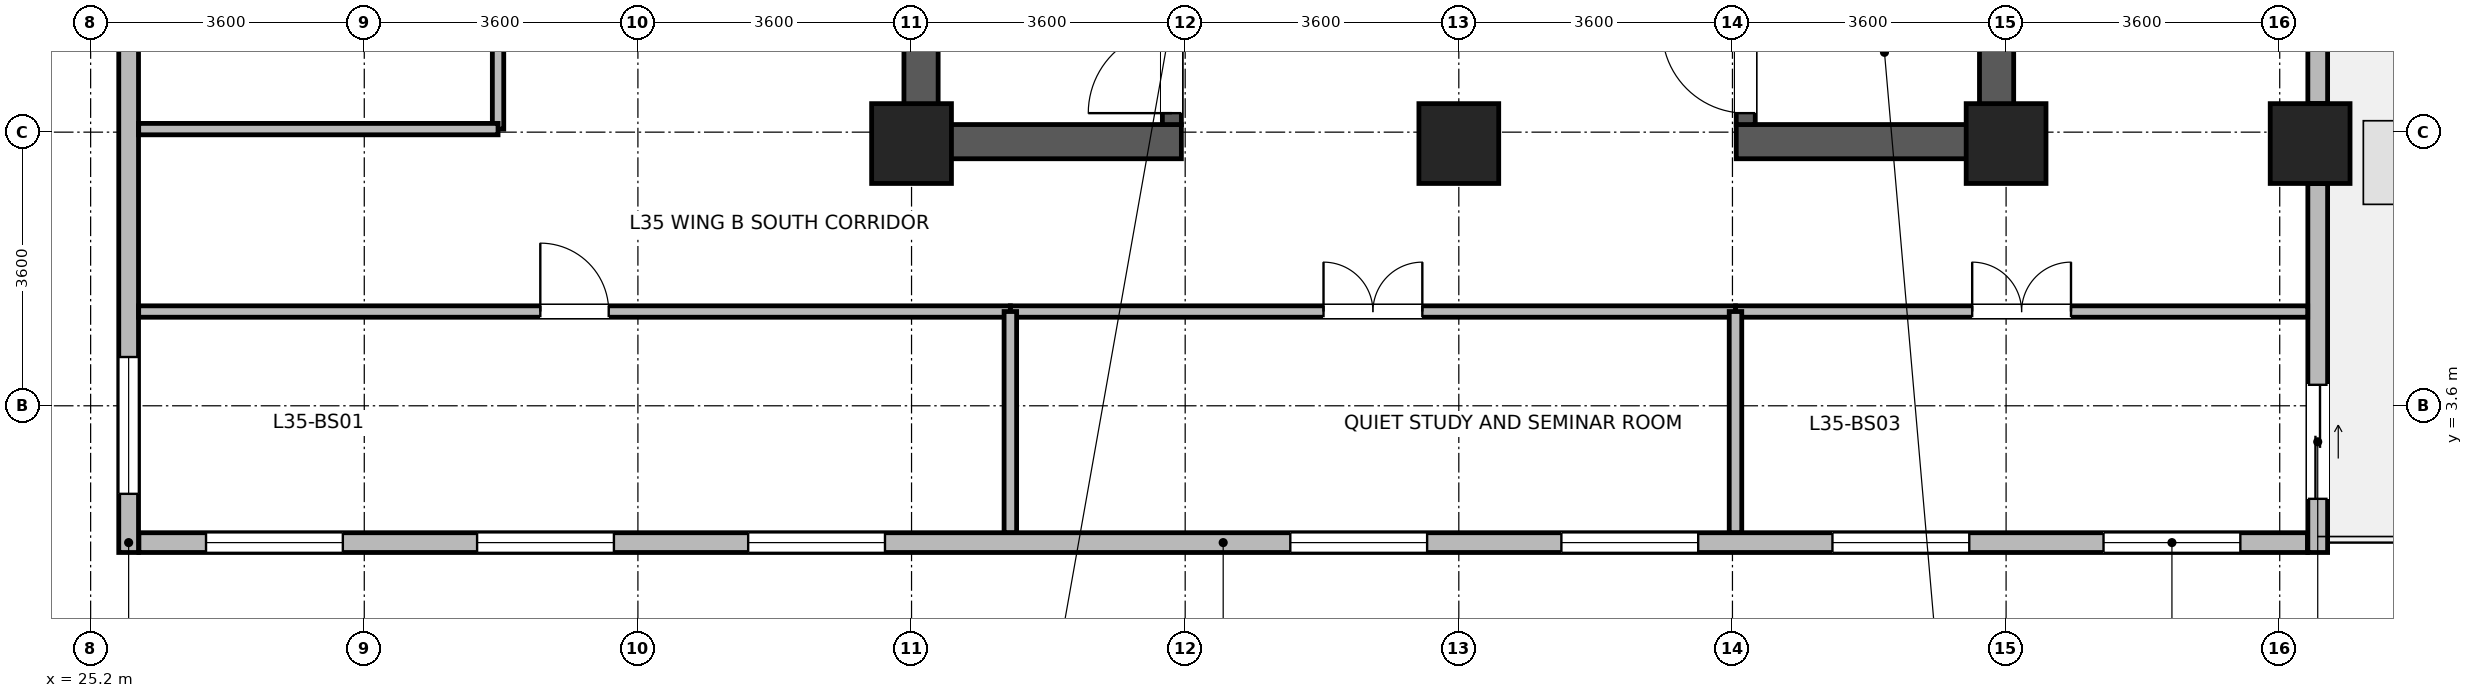
"""IFC4 building model, lengths in metres.
Left out: names, types, materials, properties, quantities, classifications, styles, units other than length and angle.
Written with IfcOpenShell. Run it as: python <this file> out.ifc"""

import sys

from ifc_helpers import new_model, si_unit, direction, frame, frame_2d, origin, origin_2d, place, context, subcontext, project, spatial, rectangle, extrude, source, transform, mapped, element, fill, save


model = new_model("IFC4")
c1 = context("Model", 3, precision=1e-05, world=origin(), true_north=direction((0.0, 1.0)))
c2 = subcontext(c1, "Body", "Model", "MODEL_VIEW")
j1 = project(units=[si_unit("LENGTHUNIT", "METRE"), si_unit("PLANEANGLEUNIT", "RADIAN")], contexts=[c1])
p1 = place(None, origin())
s1 = spatial("IfcSite", under=j1, at=p1, CompositionType="ELEMENT")
p2 = place(p1, origin())
s2 = spatial("IfcBuilding", under=s1, at=p2, CompositionType="ELEMENT")
p3 = place(p2, frame((0.0, 0.0, 140.2)))
s3 = spatial("IfcBuildingStorey", under=s2, at=p3, CompositionType="ELEMENT", Elevation=140.2)
for number, where, z_axis, x_axis in (
    (1, (36.125, 6.85, 0.0), (0.0, 0.0, 1.0), (0.0, 1.0, 0.0)),
    (2, (50.275, 6.85, 0.0), (0.0, 0.0, 1.0), (0.0, 1.0, 0.0)),
):
    element("IfcWall", number, at=place(p3, frame(where, z_axis=z_axis, x_axis=x_axis)), inside=s3, PredefinedType="SHEAR", context=c2, shape_type="SweptSolid", body=[
        extrude(rectangle(XDim=7.9, YDim=0.45, at=frame_2d((3.95, 0.0))), origin(), (0.0, 0.0, 1.0), 3.46),
    ])
for number, where, z_axis, x_axis in (
    (3, (36.35, 7.075, 0.0), (0.0, 0.0, 1.0), (1.0, 0.0, 0.0)),
    (4, (46.85, 7.075, 0.0), (0.0, 0.0, 1.0), (1.0, 0.0, 0.0)),
):
    element("IfcWall", number, at=place(p3, frame(where, z_axis=z_axis, x_axis=x_axis)), inside=s3, PredefinedType="SHEAR", context=c2, shape_type="SweptSolid", body=[
        extrude(rectangle(XDim=3.2, YDim=0.45, at=frame_2d((1.6, 0.0))), origin(), (0.0, 0.0, 1.0), 3.46),
    ])
p4 = place(p3, frame((39.425, 7.3, 0.0), z_axis=(0.0, 0.0, 1.0), x_axis=(0.0, 1.0, 0.0)))
e5 = element("IfcWall", 5, at=p4, inside=s3, PredefinedType="SHEAR", context=c2, shape_type="SweptSolid", body=[
    extrude(rectangle(XDim=7.0, YDim=0.25, at=frame_2d((3.5, 0.0))), origin(), (0.0, 0.0, 1.0), 3.46),
])
p5 = place(p4, frame((0.15, 0.0, 0.0)))
e6 = element("IfcOpeningElement", 6, at=p5, cuts=e5, PredefinedType="OPENING", context=c2, shape_type="SweptSolid", body=[
    extrude(rectangle(XDim=1.1, YDim=2.08, at=frame_2d((0.55, 1.04))), frame((0.0, 0.135, 0.0), z_axis=(0.0, -1.0, 0.0), x_axis=(1.0, 0.0, 0.0)), (0.0, 0.0, 1.0), 0.27),
])
p6 = place(p3, frame((46.975, 7.3, 0.0), z_axis=(0.0, 0.0, 1.0), x_axis=(0.0, 1.0, 0.0)))
e7 = element("IfcWall", 7, at=p6, inside=s3, PredefinedType="SHEAR", context=c2, shape_type="SweptSolid", body=[
    extrude(rectangle(XDim=7.0, YDim=0.25, at=frame_2d((3.5, 0.0))), origin(), (0.0, 0.0, 1.0), 3.46),
])
p7 = place(p6, frame((0.15, 0.0, 0.0)))
e8 = element("IfcOpeningElement", 8, at=p7, cuts=e7, PredefinedType="OPENING", context=c2, shape_type="SweptSolid", body=[
    extrude(rectangle(XDim=1.1, YDim=2.08, at=frame_2d((0.55, 1.04))), frame((0.0, 0.135, 0.0), z_axis=(0.0, -1.0, 0.0), x_axis=(1.0, 0.0, 0.0)), (0.0, 0.0, 1.0), 0.27),
])
m1 = source(origin(), c2, "Body", "SweptSolid", [
    extrude(rectangle(XDim=1.05, YDim=1.05, at=origin_2d()), origin(), (0.0, 0.0, 1.0), 3.7),
])
for number, where, z_axis, x_axis in (
    (9, (36.0, 7.05, 0.0), (0.0, 0.0, 1.0), (1.0, 0.0, 0.0)),
    (10, (43.2, 7.05, 0.0), (0.0, 0.0, 1.0), (1.0, 0.0, 0.0)),
    (11, (50.4, 7.05, 0.0), (0.0, 0.0, 1.0), (1.0, 0.0, 0.0)),
    (12, (54.4, 7.05, 0.0), (0.0, 0.0, 1.0), (1.0, 0.0, 0.0)),
):
    element("IfcColumn", number, at=place(p3, frame(where, z_axis=z_axis, x_axis=x_axis)), inside=s3, PredefinedType="COLUMN", context=c2, shape_type="MappedRepresentation", body=[
        mapped(m1, transform((0.0, 0.0, 0.0), x_axis=(1.0, 0.0, 0.0), y_axis=(0.0, 1.0, 0.0), z_axis=(0.0, 0.0, 1.0), scale=1.0)),
    ])
p8 = place(p3, frame((54.365, 1.8, 0.0), z_axis=(0.0, 0.0, 1.0), x_axis=(-1.0, 0.0, 0.0)))
e13 = element("IfcWall", 13, at=p8, inside=s3, PredefinedType="STANDARD", context=c2, shape_type="SweptSolid", body=[
    extrude(rectangle(XDim=28.53, YDim=0.26, at=frame_2d((14.265, 0.0))), origin(), (0.0, 0.0, 1.0), 3.44),
])
p9 = place(p8, frame((0.883, 0.0, 0.85)))
e14 = element("IfcOpeningElement", 14, at=p9, cuts=e13, PredefinedType="OPENING", context=c2, shape_type="SweptSolid", body=[
    extrude(rectangle(XDim=1.8, YDim=1.85, at=frame_2d((0.9, 0.925))), frame((0.0, 0.14, 0.0), z_axis=(0.0, -1.0, 0.0), x_axis=(1.0, 0.0, 0.0)), (0.0, 0.0, 1.0), 0.28),
])
p10 = place(p8, frame((4.449, 0.0, 0.85)))
e15 = element("IfcOpeningElement", 15, at=p10, cuts=e13, PredefinedType="OPENING", context=c2, shape_type="SweptSolid", body=[
    extrude(rectangle(XDim=1.8, YDim=1.85, at=frame_2d((0.9, 0.925))), frame((0.0, 0.14, 0.0), z_axis=(0.0, -1.0, 0.0), x_axis=(1.0, 0.0, 0.0)), (0.0, 0.0, 1.0), 0.28),
])
p11 = place(p8, frame((8.016, 0.0, 0.85)))
e16 = element("IfcOpeningElement", 16, at=p11, cuts=e13, PredefinedType="OPENING", context=c2, shape_type="SweptSolid", body=[
    extrude(rectangle(XDim=1.8, YDim=1.85, at=frame_2d((0.9, 0.925))), frame((0.0, 0.14, 0.0), z_axis=(0.0, -1.0, 0.0), x_axis=(1.0, 0.0, 0.0)), (0.0, 0.0, 1.0), 0.28),
])
p12 = place(p8, frame((11.582, 0.0, 0.85)))
e17 = element("IfcOpeningElement", 17, at=p12, cuts=e13, PredefinedType="OPENING", context=c2, shape_type="SweptSolid", body=[
    extrude(rectangle(XDim=1.8, YDim=1.85, at=frame_2d((0.9, 0.925))), frame((0.0, 0.14, 0.0), z_axis=(0.0, -1.0, 0.0), x_axis=(1.0, 0.0, 0.0)), (0.0, 0.0, 1.0), 0.28),
])
p13 = place(p8, frame((18.714, 0.0, 0.85)))
e18 = element("IfcOpeningElement", 18, at=p13, cuts=e13, PredefinedType="OPENING", context=c2, shape_type="SweptSolid", body=[
    extrude(rectangle(XDim=1.8, YDim=1.85, at=frame_2d((0.9, 0.925))), frame((0.0, 0.14, 0.0), z_axis=(0.0, -1.0, 0.0), x_axis=(1.0, 0.0, 0.0)), (0.0, 0.0, 1.0), 0.28),
])
p14 = place(p8, frame((22.281, 0.0, 0.85)))
e19 = element("IfcOpeningElement", 19, at=p14, cuts=e13, PredefinedType="OPENING", context=c2, shape_type="SweptSolid", body=[
    extrude(rectangle(XDim=1.8, YDim=1.85, at=frame_2d((0.9, 0.925))), frame((0.0, 0.14, 0.0), z_axis=(0.0, -1.0, 0.0), x_axis=(1.0, 0.0, 0.0)), (0.0, 0.0, 1.0), 0.28),
])
p15 = place(p8, frame((25.847, 0.0, 0.85)))
e20 = element("IfcOpeningElement", 20, at=p15, cuts=e13, PredefinedType="OPENING", context=c2, shape_type="SweptSolid", body=[
    extrude(rectangle(XDim=1.8, YDim=1.85, at=frame_2d((0.9, 0.925))), frame((0.0, 0.14, 0.0), z_axis=(0.0, -1.0, 0.0), x_axis=(1.0, 0.0, 0.0)), (0.0, 0.0, 1.0), 0.28),
])
p16 = place(p3, frame((54.5, 6.524, 0.0), z_axis=(0.0, 0.0, 1.0), x_axis=(0.0, -1.0, 0.0)))
e21 = element("IfcWall", 21, at=p16, inside=s3, PredefinedType="STANDARD", context=c2, shape_type="SweptSolid", body=[
    extrude(rectangle(XDim=4.854, YDim=0.26, at=frame_2d((2.427, 0.0))), origin(), (0.0, 0.0, 1.0), 3.44),
])
p17 = place(p16, frame((2.648, 0.0, 0.0)))
e22 = element("IfcOpeningElement", 22, at=p17, cuts=e21, PredefinedType="OPENING", context=c2, shape_type="SweptSolid", body=[
    extrude(rectangle(XDim=1.5, YDim=2.15, at=frame_2d((0.75, 1.075))), frame((0.0, 0.14, 0.0), z_axis=(0.0, -1.0, 0.0), x_axis=(1.0, 0.0, 0.0)), (0.0, 0.0, 1.0), 0.28),
])
p18 = place(p3, frame((54.5, 14.024, 0.0), z_axis=(0.0, 0.0, 1.0), x_axis=(0.0, -1.0, 0.0)))
e23 = element("IfcWall", 23, at=p18, inside=s3, PredefinedType="STANDARD", context=c2, shape_type="SweptSolid", body=[
    extrude(rectangle(XDim=6.448, YDim=0.26, at=frame_2d((3.224, 0.0))), origin(), (0.0, 0.0, 1.0), 2.99),
])
p19 = place(p18, frame((3.936, 0.0, 0.85)))
e24 = element("IfcOpeningElement", 24, at=p19, cuts=e23, PredefinedType="OPENING", context=c2, shape_type="SweptSolid", body=[
    extrude(rectangle(XDim=1.8, YDim=1.85, at=frame_2d((0.9, 0.925))), frame((0.0, 0.14, 0.0), z_axis=(0.0, -1.0, 0.0), x_axis=(1.0, 0.0, 0.0)), (0.0, 0.0, 1.0), 0.28),
])
p20 = place(p18, frame((1.15, 0.0, 0.85)))
e25 = element("IfcOpeningElement", 25, at=p20, cuts=e23, PredefinedType="OPENING", context=c2, shape_type="SweptSolid", body=[
    extrude(rectangle(XDim=0.95, YDim=1.75, at=frame_2d((0.475, 0.875))), frame((0.0, 0.14, 0.0), z_axis=(0.0, -1.0, 0.0), x_axis=(1.0, 0.0, 0.0)), (0.0, 0.0, 1.0), 0.28),
])
p21 = place(p3, frame((25.7, 1.67, 0.0), z_axis=(0.0, 0.0, 1.0), x_axis=(0.0, 1.0, 0.0)))
e26 = element("IfcWall", 26, at=p21, inside=s3, PredefinedType="STANDARD", context=c2, shape_type="SweptSolid", body=[
    extrude(rectangle(XDim=20.06, YDim=0.26, at=frame_2d((10.03, 0.0))), origin(), (0.0, 0.0, 1.0), 3.44),
])
p22 = place(p21, frame((0.772, 0.0, 0.85)))
e27 = element("IfcOpeningElement", 27, at=p22, cuts=e26, PredefinedType="OPENING", context=c2, shape_type="SweptSolid", body=[
    extrude(rectangle(XDim=1.8, YDim=1.85, at=frame_2d((0.9, 0.925))), frame((0.0, 0.14, 0.0), z_axis=(0.0, -1.0, 0.0), x_axis=(1.0, 0.0, 0.0)), (0.0, 0.0, 1.0), 0.28),
])
p23 = place(p21, frame((7.458, 0.0, 0.85)))
e28 = element("IfcOpeningElement", 28, at=p23, cuts=e26, PredefinedType="OPENING", context=c2, shape_type="SweptSolid", body=[
    extrude(rectangle(XDim=1.8, YDim=1.85, at=frame_2d((0.9, 0.925))), frame((0.0, 0.14, 0.0), z_axis=(0.0, -1.0, 0.0), x_axis=(1.0, 0.0, 0.0)), (0.0, 0.0, 1.0), 0.28),
])
p24 = place(p21, frame((14.145, 0.0, 0.85)))
e29 = element("IfcOpeningElement", 29, at=p24, cuts=e26, PredefinedType="OPENING", context=c2, shape_type="SweptSolid", body=[
    extrude(rectangle(XDim=1.8, YDim=1.85, at=frame_2d((0.9, 0.925))), frame((0.0, 0.14, 0.0), z_axis=(0.0, -1.0, 0.0), x_axis=(1.0, 0.0, 0.0)), (0.0, 0.0, 1.0), 0.28),
])
p25 = place(p21, frame((17.488, 0.0, 0.85)))
e30 = element("IfcOpeningElement", 30, at=p25, cuts=e26, PredefinedType="OPENING", context=c2, shape_type="SweptSolid", body=[
    extrude(rectangle(XDim=1.8, YDim=1.85, at=frame_2d((0.9, 0.925))), frame((0.0, 0.14, 0.0), z_axis=(0.0, -1.0, 0.0), x_axis=(1.0, 0.0, 0.0)), (0.0, 0.0, 1.0), 0.28),
])
p26 = place(p3, frame((25.832, 4.84, 0.0), z_axis=(0.0, 0.0, 1.0), x_axis=(1.0, 0.0, 0.0)))
e31 = element("IfcWall", 31, at=p26, inside=s3, PredefinedType="PARTITIONING", context=c2, shape_type="SweptSolid", body=[
    extrude(rectangle(XDim=11.468, YDim=0.15, at=frame_2d((5.734, 0.0))), origin(), (0.0, 0.0, 1.0), 3.44),
])
p27 = place(p26, frame((5.284, 0.0, 0.0)))
e32 = element("IfcOpeningElement", 32, at=p27, cuts=e31, PredefinedType="OPENING", context=c2, shape_type="SweptSolid", body=[
    extrude(rectangle(XDim=0.9, YDim=2.08, at=frame_2d((0.45, 1.04))), frame((0.0, 0.085, 0.0), z_axis=(0.0, -1.0, 0.0), x_axis=(1.0, 0.0, 0.0)), (0.0, 0.0, 1.0), 0.17),
])
p28 = place(p3, frame((37.3, 4.84, 0.0), z_axis=(0.0, 0.0, 1.0), x_axis=(1.0, 0.0, 0.0)))
e33 = element("IfcWall", 33, at=p28, inside=s3, PredefinedType="PARTITIONING", context=c2, shape_type="SweptSolid", body=[
    extrude(rectangle(XDim=9.54, YDim=0.15, at=frame_2d((4.77, 0.0))), origin(), (0.0, 0.0, 1.0), 3.44),
])
p29 = place(p28, frame((4.12, 0.0, 0.0)))
e34 = element("IfcOpeningElement", 34, at=p29, cuts=e33, PredefinedType="OPENING", context=c2, shape_type="SweptSolid", body=[
    extrude(rectangle(XDim=1.3, YDim=2.12, at=frame_2d((0.65, 1.06))), frame((0.0, 0.085, 0.0), z_axis=(0.0, -1.0, 0.0), x_axis=(1.0, 0.0, 0.0)), (0.0, 0.0, 1.0), 0.17),
])
p30 = place(p3, frame((46.84, 4.84, 0.0), z_axis=(0.0, 0.0, 1.0), x_axis=(1.0, 0.0, 0.0)))
e35 = element("IfcWall", 35, at=p30, inside=s3, PredefinedType="PARTITIONING", context=c2, shape_type="SweptSolid", body=[
    extrude(rectangle(XDim=7.528, YDim=0.15, at=frame_2d((3.764, 0.0))), origin(), (0.0, 0.0, 1.0), 3.44),
])
p31 = place(p30, frame((3.114, 0.0, 0.0)))
e36 = element("IfcOpeningElement", 36, at=p31, cuts=e35, PredefinedType="OPENING", context=c2, shape_type="SweptSolid", body=[
    extrude(rectangle(XDim=1.3, YDim=2.12, at=frame_2d((0.65, 1.06))), frame((0.0, 0.085, 0.0), z_axis=(0.0, -1.0, 0.0), x_axis=(1.0, 0.0, 0.0)), (0.0, 0.0, 1.0), 0.17),
])
p32 = place(p3, frame((30.56, 7.24, 0.0), z_axis=(0.0, 0.0, 1.0), x_axis=(0.0, 1.0, 0.0)))
e37 = element("IfcWall", 37, at=p32, inside=s3, PredefinedType="PARTITIONING", context=c2, shape_type="SweptSolid", body=[
    extrude(rectangle(XDim=7.26, YDim=0.15, at=frame_2d((3.63, 0.0))), origin(), (0.0, 0.0, 1.0), 3.44),
])
p33 = place(p32, frame((2.98, 0.0, 0.0)))
e38 = element("IfcOpeningElement", 38, at=p33, cuts=e37, PredefinedType="OPENING", context=c2, shape_type="SweptSolid", body=[
    extrude(rectangle(XDim=1.3, YDim=2.12, at=frame_2d((0.65, 1.06))), frame((0.0, 0.085, 0.0), z_axis=(0.0, -1.0, 0.0), x_axis=(1.0, 0.0, 0.0)), (0.0, 0.0, 1.0), 0.17),
])
p34 = place(p3, frame((25.832, 7.24, 0.0), z_axis=(0.0, 0.0, 1.0), x_axis=(1.0, 0.0, 0.0)))
e39 = element("IfcWall", 39, at=p34, inside=s3, PredefinedType="PARTITIONING", context=c2, shape_type="SweptSolid", body=[
    extrude(rectangle(XDim=4.728, YDim=0.15, at=frame_2d((2.364, 0.0))), origin(), (0.0, 0.0, 1.0), 3.44),
])
for number, where, z_axis, x_axis in (
    (40, (37.3, 1.932, 0.0), (0.0, 0.0, 1.0), (0.0, 1.0, 0.0)),
    (41, (46.84, 1.932, 0.0), (0.0, 0.0, 1.0), (0.0, 1.0, 0.0)),
):
    element("IfcWall", number, at=place(p3, frame(where, z_axis=z_axis, x_axis=x_axis)), inside=s3, PredefinedType="PARTITIONING", context=c2, shape_type="SweptSolid", body=[
        extrude(rectangle(XDim=2.908, YDim=0.165, at=frame_2d((1.454, 0.0))), origin(), (0.0, 0.0, 1.0), 3.44),
    ])
p35 = place(p9, origin())
e42 = element("IfcWindow", 42, at=p35, inside=s3, PartitioningType="SINGLE_PANEL", PredefinedType="WINDOW", context=c2, shape_type="SweptSolid", body=[
    extrude(rectangle(XDim=1.8, YDim=1.85, at=frame_2d((0.9, 0.925))), frame((0.0, 0.03, 0.0), z_axis=(0.0, -1.0, 0.0), x_axis=(1.0, 0.0, 0.0)), (0.0, 0.0, 1.0), 0.06),
])
fill(e14, e42)
p36 = place(p10, origin())
e43 = element("IfcWindow", 43, at=p36, inside=s3, PartitioningType="SINGLE_PANEL", PredefinedType="WINDOW", context=c2, shape_type="SweptSolid", body=[
    extrude(rectangle(XDim=1.8, YDim=1.85, at=frame_2d((0.9, 0.925))), frame((0.0, 0.03, 0.0), z_axis=(0.0, -1.0, 0.0), x_axis=(1.0, 0.0, 0.0)), (0.0, 0.0, 1.0), 0.06),
])
fill(e15, e43)
p37 = place(p11, origin())
e44 = element("IfcWindow", 44, at=p37, inside=s3, PartitioningType="SINGLE_PANEL", PredefinedType="WINDOW", context=c2, shape_type="SweptSolid", body=[
    extrude(rectangle(XDim=1.8, YDim=1.85, at=frame_2d((0.9, 0.925))), frame((0.0, 0.03, 0.0), z_axis=(0.0, -1.0, 0.0), x_axis=(1.0, 0.0, 0.0)), (0.0, 0.0, 1.0), 0.06),
])
fill(e16, e44)
p38 = place(p12, origin())
e45 = element("IfcWindow", 45, at=p38, inside=s3, PartitioningType="SINGLE_PANEL", PredefinedType="WINDOW", context=c2, shape_type="SweptSolid", body=[
    extrude(rectangle(XDim=1.8, YDim=1.85, at=frame_2d((0.9, 0.925))), frame((0.0, 0.03, 0.0), z_axis=(0.0, -1.0, 0.0), x_axis=(1.0, 0.0, 0.0)), (0.0, 0.0, 1.0), 0.06),
])
fill(e17, e45)
p39 = place(p13, origin())
e46 = element("IfcWindow", 46, at=p39, inside=s3, PartitioningType="SINGLE_PANEL", PredefinedType="WINDOW", context=c2, shape_type="SweptSolid", body=[
    extrude(rectangle(XDim=1.8, YDim=1.85, at=frame_2d((0.9, 0.925))), frame((0.0, 0.03, 0.0), z_axis=(0.0, -1.0, 0.0), x_axis=(1.0, 0.0, 0.0)), (0.0, 0.0, 1.0), 0.06),
])
fill(e18, e46)
p40 = place(p14, origin())
e47 = element("IfcWindow", 47, at=p40, inside=s3, PartitioningType="SINGLE_PANEL", PredefinedType="WINDOW", context=c2, shape_type="SweptSolid", body=[
    extrude(rectangle(XDim=1.8, YDim=1.85, at=frame_2d((0.9, 0.925))), frame((0.0, 0.03, 0.0), z_axis=(0.0, -1.0, 0.0), x_axis=(1.0, 0.0, 0.0)), (0.0, 0.0, 1.0), 0.06),
])
fill(e19, e47)
p41 = place(p15, origin())
e48 = element("IfcWindow", 48, at=p41, inside=s3, PartitioningType="SINGLE_PANEL", PredefinedType="WINDOW", context=c2, shape_type="SweptSolid", body=[
    extrude(rectangle(XDim=1.8, YDim=1.85, at=frame_2d((0.9, 0.925))), frame((0.0, 0.03, 0.0), z_axis=(0.0, -1.0, 0.0), x_axis=(1.0, 0.0, 0.0)), (0.0, 0.0, 1.0), 0.06),
])
fill(e20, e48)
p42 = place(p17, origin())
e49 = element("IfcDoor", 49, at=p42, inside=s3, OperationType="SLIDING_TO_LEFT", PredefinedType="DOOR", context=c2, shape_type="SweptSolid", body=[
    extrude(rectangle(XDim=1.5, YDim=2.15, at=frame_2d((0.75, 1.075))), frame((0.0, 0.025, 0.0), z_axis=(0.0, -1.0, 0.0), x_axis=(1.0, 0.0, 0.0)), (0.0, 0.0, 1.0), 0.05),
])
fill(e22, e49)
p43 = place(p22, origin())
e50 = element("IfcWindow", 50, at=p43, inside=s3, PartitioningType="SINGLE_PANEL", PredefinedType="WINDOW", context=c2, shape_type="SweptSolid", body=[
    extrude(rectangle(XDim=1.8, YDim=1.85, at=frame_2d((0.9, 0.925))), frame((0.0, 0.03, 0.0), z_axis=(0.0, -1.0, 0.0), x_axis=(1.0, 0.0, 0.0)), (0.0, 0.0, 1.0), 0.06),
])
fill(e27, e50)
p44 = place(p5, origin())
e51 = element("IfcDoor", 51, at=p44, inside=s3, OperationType="SINGLE_SWING_LEFT", PredefinedType="DOOR", context=c2, shape_type="SweptSolid", body=[
    extrude(rectangle(XDim=1.1, YDim=2.08, at=frame_2d((0.55, 1.04))), frame((0.0, 0.025, 0.0), z_axis=(0.0, -1.0, 0.0), x_axis=(1.0, 0.0, 0.0)), (0.0, 0.0, 1.0), 0.05),
])
fill(e6, e51)
p45 = place(p7, origin())
e52 = element("IfcDoor", 52, at=p45, inside=s3, OperationType="SINGLE_SWING_RIGHT", PredefinedType="DOOR", context=c2, shape_type="SweptSolid", body=[
    extrude(rectangle(XDim=1.1, YDim=2.08, at=frame_2d((0.55, 1.04))), frame((0.0, 0.025, 0.0), z_axis=(0.0, -1.0, 0.0), x_axis=(1.0, 0.0, 0.0)), (0.0, 0.0, 1.0), 0.05),
])
fill(e8, e52)
p46 = place(p27, origin())
e53 = element("IfcDoor", 53, at=p46, inside=s3, OperationType="SINGLE_SWING_LEFT", PredefinedType="DOOR", context=c2, shape_type="SweptSolid", body=[
    extrude(rectangle(XDim=0.9, YDim=2.08, at=frame_2d((0.45, 1.04))), frame((0.0, 0.025, 0.0), z_axis=(0.0, -1.0, 0.0), x_axis=(1.0, 0.0, 0.0)), (0.0, 0.0, 1.0), 0.05),
])
fill(e32, e53)
p47 = place(p29, origin())
e54 = element("IfcDoor", 54, at=p47, inside=s3, OperationType="DOUBLE_DOOR_SINGLE_SWING", PredefinedType="DOOR", context=c2, shape_type="SweptSolid", body=[
    extrude(rectangle(XDim=1.3, YDim=2.12, at=frame_2d((0.65, 1.06))), frame((0.0, 0.025, 0.0), z_axis=(0.0, -1.0, 0.0), x_axis=(1.0, 0.0, 0.0)), (0.0, 0.0, 1.0), 0.05),
])
fill(e34, e54)
p48 = place(p31, origin())
e55 = element("IfcDoor", 55, at=p48, inside=s3, OperationType="DOUBLE_DOOR_SINGLE_SWING", PredefinedType="DOOR", context=c2, shape_type="SweptSolid", body=[
    extrude(rectangle(XDim=1.3, YDim=2.12, at=frame_2d((0.65, 1.06))), frame((0.0, 0.025, 0.0), z_axis=(0.0, -1.0, 0.0), x_axis=(1.0, 0.0, 0.0)), (0.0, 0.0, 1.0), 0.05),
])
fill(e36, e55)
save(model, sys.argv[1])
